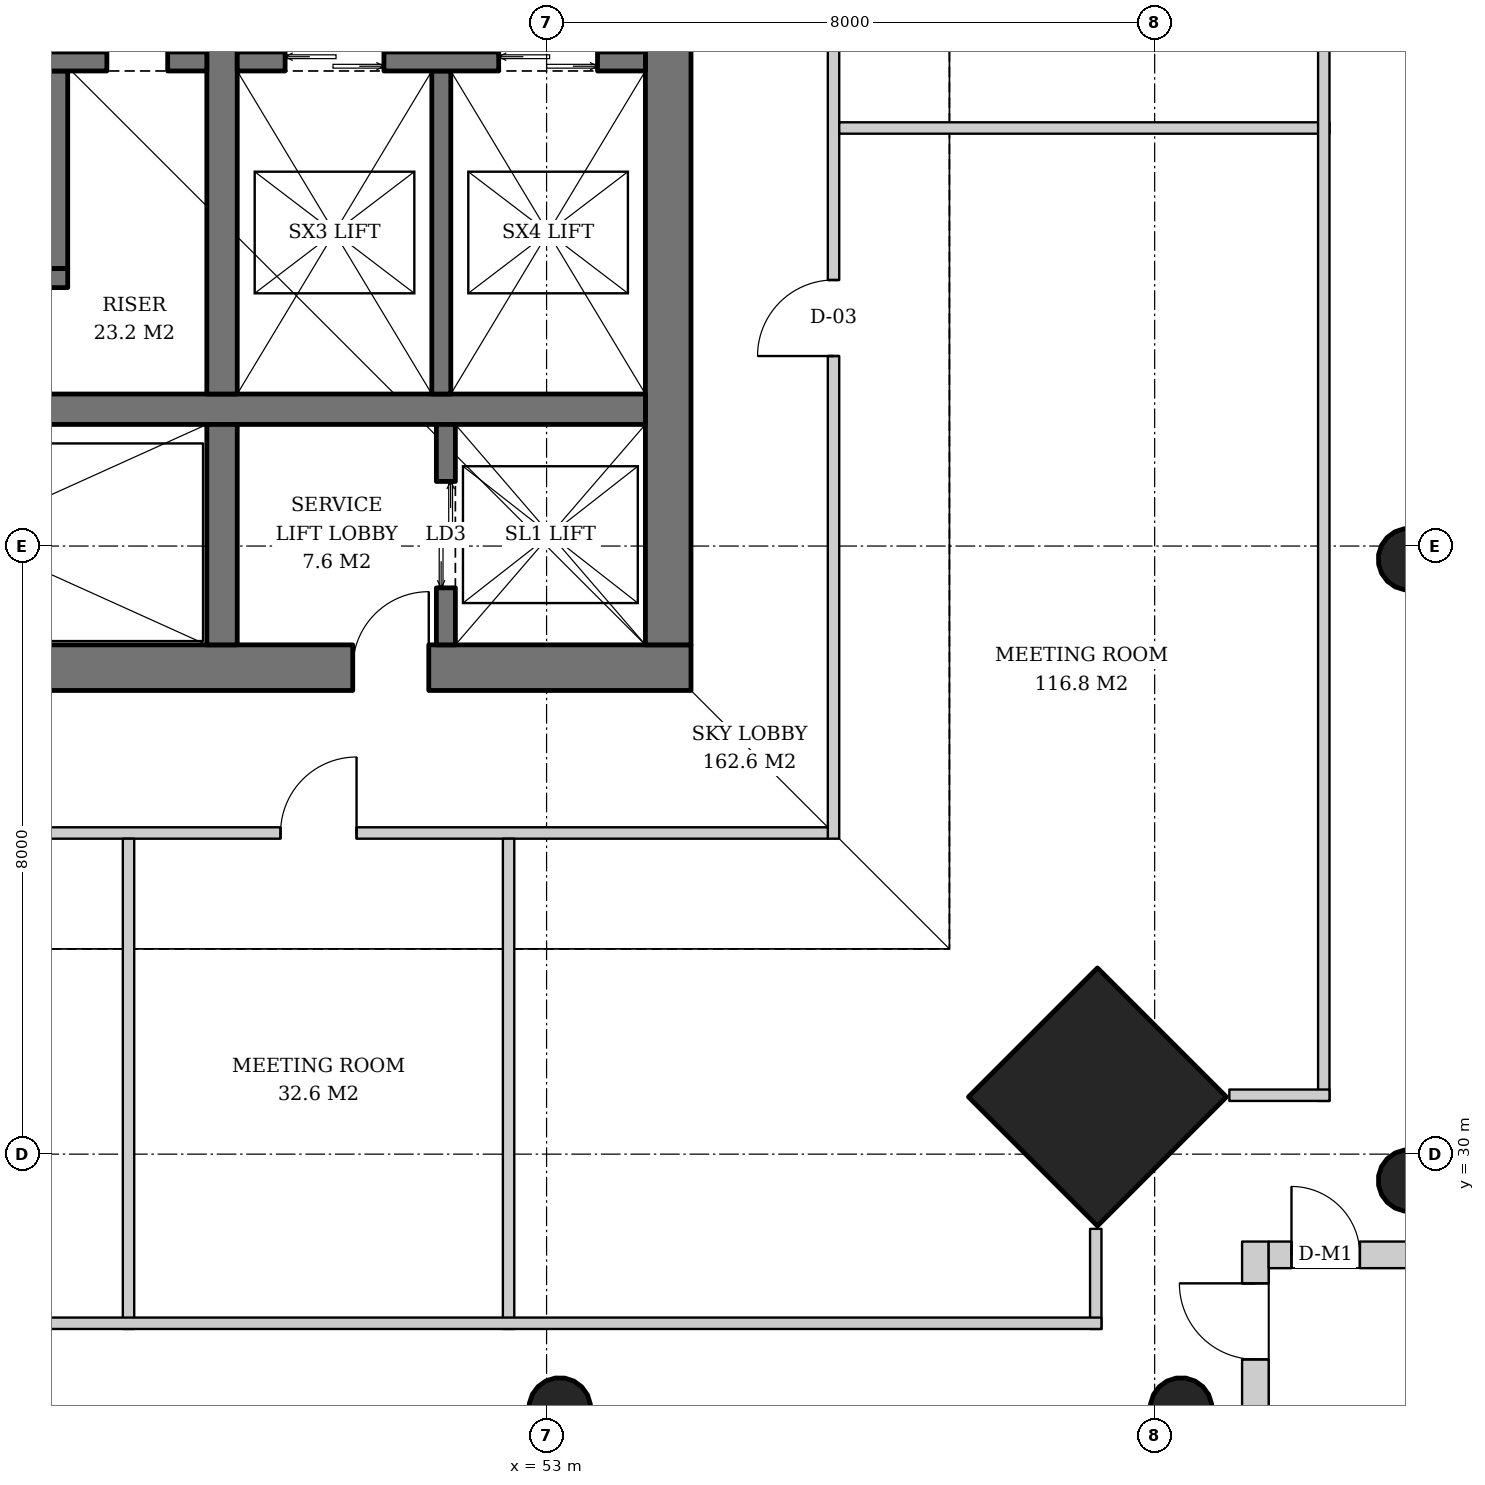
"""IFC4 building model, lengths in metres.
Left out: names, types, materials, properties, quantities, classifications, styles, units other than length and angle.
Written with IfcOpenShell. Run it as: python <this file> out.ifc"""

import sys

from ifc_helpers import new_model, si_unit, direction, frame, frame_2d, origin, origin_2d, place, context, subcontext, project, spatial, rectangle, hollow_circle, extrude, element, fill, save


model = new_model("IFC4")
c1 = context("Model", 3, precision=1e-05, world=origin(), true_north=direction((0.0, 1.0)))
c2 = subcontext(c1, "Body", "Model", "MODEL_VIEW")
j1 = project(units=[si_unit("LENGTHUNIT", "METRE"), si_unit("PLANEANGLEUNIT", "RADIAN")], contexts=[c1])
p1 = place(None, origin())
s1 = spatial("IfcSite", under=j1, at=p1, CompositionType="ELEMENT")
p2 = place(p1, origin())
s2 = spatial("IfcBuilding", under=s1, at=p2, CompositionType="ELEMENT")
p3 = place(p2, frame((0.0, 0.0, 165.4)))
s3 = spatial("IfcBuildingStorey", under=s2, at=p3, CompositionType="ELEMENT", Elevation=165.4)
p4 = place(p3, frame((64.386, 29.614, 0.0), z_axis=(-0.031898107953, 0.031898107953, 0.998981992539), x_axis=(-0.707106781187, -0.707106781187, 0.0)))
e1 = element("IfcColumn", 1, at=p4, inside=s3, PredefinedType="COLUMN", context=c2, shape_type="SweptSolid", body=[
    extrude(hollow_circle(Radius=0.406, WallThickness=0.03, at=origin_2d()), origin(), (0.0, 0.0, 1.0), 3.804),
])
p5 = place(p3, frame((64.386, 37.807, 0.0), z_axis=(-0.031910269556, 0.015987237665, 0.999362868496), x_axis=(-0.447933021895, -0.894067115991, 0.0)))
e2 = element("IfcColumn", 2, at=p5, inside=s3, PredefinedType="COLUMN", context=c2, shape_type="SweptSolid", body=[
    extrude(hollow_circle(Radius=0.406, WallThickness=0.03, at=origin_2d()), origin(), (0.0, 0.0, 1.0), 3.802),
])
p6 = place(p3, frame((60.286, 30.714, 0.0), z_axis=(-0.031898107953, 0.031898107953, 0.998981992539), x_axis=(-0.707106781187, -0.707106781187, 0.0)))
e3 = element("IfcColumn", 3, at=p6, inside=s3, PredefinedType="COLUMN", context=c2, shape_type="SweptSolid", body=[
    extrude(rectangle(XDim=2.4, YDim=2.4, at=origin_2d()), origin(), (0.0, 0.0, 1.0), 3.804),
])
p7 = place(p3, frame((61.386, 26.614, 0.0), z_axis=(-0.031898107953, 0.031898107953, 0.998981992539), x_axis=(-0.707106781187, -0.707106781187, 0.0)))
e4 = element("IfcColumn", 4, at=p7, inside=s3, PredefinedType="COLUMN", context=c2, shape_type="SweptSolid", body=[
    extrude(hollow_circle(Radius=0.406, WallThickness=0.03, at=origin_2d()), origin(), (0.0, 0.0, 1.0), 3.804),
])
p8 = place(p3, frame((53.193, 26.614, 0.0), z_axis=(-0.015987237665, 0.031910269556, 0.999362868496), x_axis=(-0.894067115991, -0.447933021895, 0.0)))
e5 = element("IfcColumn", 5, at=p8, inside=s3, PredefinedType="COLUMN", context=c2, shape_type="SweptSolid", body=[
    extrude(hollow_circle(Radius=0.406, WallThickness=0.03, at=origin_2d()), origin(), (0.0, 0.0, 1.0), 3.802),
])
p9 = place(p3, frame((35.1, 36.4, 0.0), z_axis=(0.0, 0.0, 1.0), x_axis=(1.0, 0.0, 0.0)))
e6 = element("IfcWall", 6, at=p9, inside=s3, PredefinedType="SHEAR", context=c2, shape_type="SweptSolid", body=[
    extrude(rectangle(XDim=19.8, YDim=0.6, at=frame_2d((9.9, 0.0))), origin(), (0.0, 0.0, 1.0), 3.8),
])
p10 = place(p9, frame((3.9, 0.0, 0.0)))
e7 = element("IfcOpeningElement", 7, at=p10, cuts=e6, PredefinedType="OPENING", context=c2, shape_type="SweptSolid", body=[
    extrude(rectangle(XDim=1.0, YDim=2.1, at=frame_2d((0.5, 1.05))), frame((0.0, 0.31, 0.0), z_axis=(0.0, -1.0, 0.0), x_axis=(1.0, 0.0, 0.0)), (0.0, 0.0, 1.0), 0.62),
])
p11 = place(p9, frame((15.35, 0.0, 0.0)))
e8 = element("IfcOpeningElement", 8, at=p11, cuts=e6, PredefinedType="OPENING", context=c2, shape_type="SweptSolid", body=[
    extrude(rectangle(XDim=1.0, YDim=2.1, at=frame_2d((0.5, 1.05))), frame((0.0, 0.31, 0.0), z_axis=(0.0, -1.0, 0.0), x_axis=(1.0, 0.0, 0.0)), (0.0, 0.0, 1.0), 0.62),
])
p12 = place(p3, frame((54.6, 36.7, 0.0), z_axis=(0.0, 0.0, 1.0), x_axis=(0.0, 1.0, 0.0)))
e9 = element("IfcWall", 9, at=p12, inside=s3, PredefinedType="SHEAR", context=c2, shape_type="SweptSolid", body=[
    extrude(rectangle(XDim=18.6, YDim=0.6, at=frame_2d((9.3, 0.0))), origin(), (0.0, 0.0, 1.0), 3.8),
])
p13 = place(p12, frame((8.4, 0.0, 0.0)))
e10 = element("IfcOpeningElement", 10, at=p13, cuts=e9, PredefinedType="OPENING", context=c2, shape_type="SweptSolid", body=[
    extrude(rectangle(XDim=1.8, YDim=2.4, at=frame_2d((0.9, 1.2))), frame((0.0, 0.31, 0.0), z_axis=(0.0, -1.0, 0.0), x_axis=(1.0, 0.0, 0.0)), (0.0, 0.0, 1.0), 0.62),
])
p14 = place(p3, frame((35.7, 39.8, 0.0), z_axis=(0.0, 0.0, 1.0), x_axis=(1.0, 0.0, 0.0)))
e11 = element("IfcWall", 11, at=p14, inside=s3, PredefinedType="SHEAR", context=c2, shape_type="SweptSolid", body=[
    extrude(rectangle(XDim=18.6, YDim=0.4, at=frame_2d((9.3, 0.0))), origin(), (0.0, 0.0, 1.0), 3.8),
])
p15 = place(p3, frame((48.73, 36.7, 0.0), z_axis=(0.0, 0.0, 1.0), x_axis=(0.0, 1.0, 0.0)))
e12 = element("IfcWall", 12, at=p15, inside=s3, PredefinedType="SHEAR", context=c2, shape_type="SweptSolid", body=[
    extrude(rectangle(XDim=2.9, YDim=0.4, at=frame_2d((1.45, 0.0))), origin(), (0.0, 0.0, 1.0), 3.8),
])
p16 = place(p3, frame((48.73, 40.0, 0.0), z_axis=(0.0, 0.0, 1.0), x_axis=(0.0, 1.0, 0.0)))
e13 = element("IfcWall", 13, at=p16, inside=s3, PredefinedType="SHEAR", context=c2, shape_type="SweptSolid", body=[
    extrude(rectangle(XDim=12.0, YDim=0.4, at=frame_2d((6.0, 0.0))), origin(), (0.0, 0.0, 1.0), 3.8),
])
p17 = place(p3, frame((62.325, 25.5, 0.0), z_axis=(0.0, 0.0, 1.0), x_axis=(0.0, 1.0, 0.0)))
e14 = element("IfcWall", 14, at=p17, inside=s3, PredefinedType="SOLIDWALL", context=c2, shape_type="SweptSolid", body=[
    extrude(rectangle(XDim=3.35, YDim=0.35, at=frame_2d((1.675, 0.0))), origin(), (0.0, 0.0, 1.0), 3.62),
])
p18 = place(p17, frame((1.8, 0.0, 0.0)))
e15 = element("IfcOpeningElement", 15, at=p18, cuts=e14, PredefinedType="OPENING", context=c2, shape_type="SweptSolid", body=[
    extrude(rectangle(XDim=1.0, YDim=2.4, at=frame_2d((0.5, 1.2))), frame((0.0, 0.185, 0.0), z_axis=(0.0, -1.0, 0.0), x_axis=(1.0, 0.0, 0.0)), (0.0, 0.0, 1.0), 0.37),
])
p19 = place(p3, frame((62.5, 28.675, 0.0), z_axis=(0.0, 0.0, 1.0), x_axis=(1.0, 0.0, 0.0)))
e16 = element("IfcWall", 16, at=p19, inside=s3, PredefinedType="SOLIDWALL", context=c2, shape_type="SweptSolid", body=[
    extrude(rectangle(XDim=3.0, YDim=0.35, at=frame_2d((1.5, 0.0))), origin(), (0.0, 0.0, 1.0), 3.62),
])
p20 = place(p19, frame((0.3, 0.0, 0.0)))
e17 = element("IfcOpeningElement", 17, at=p20, cuts=e16, PredefinedType="OPENING", context=c2, shape_type="SweptSolid", body=[
    extrude(rectangle(XDim=0.9, YDim=2.1, at=frame_2d((0.45, 1.05))), frame((0.0, 0.185, 0.0), z_axis=(0.0, -1.0, 0.0), x_axis=(1.0, 0.0, 0.0)), (0.0, 0.0, 1.0), 0.37),
])
p21 = place(p3, frame((51.675, 36.7, 0.0), z_axis=(0.0, 0.0, 1.0), x_axis=(0.0, 1.0, 0.0)))
e18 = element("IfcWall", 18, at=p21, inside=s3, PredefinedType="SHEAR", context=c2, shape_type="SweptSolid", body=[
    extrude(rectangle(XDim=2.9, YDim=0.25, at=frame_2d((1.45, 0.0))), origin(), (0.0, 0.0, 1.0), 3.8),
])
p22 = place(p21, frame((0.75, 0.0, 0.0)))
e19 = element("IfcOpeningElement", 19, at=p22, cuts=e18, PredefinedType="OPENING", context=c2, shape_type="SweptSolid", body=[
    extrude(rectangle(XDim=1.4, YDim=2.4, at=frame_2d((0.7, 1.2))), frame((0.0, 0.135, 0.0), z_axis=(0.0, -1.0, 0.0), x_axis=(1.0, 0.0, 0.0)), (0.0, 0.0, 1.0), 0.27),
])
p23 = place(p3, frame((46.575, 44.25, 0.0), z_axis=(0.0, 0.0, 1.0), x_axis=(0.0, -1.0, 0.0)))
e20 = element("IfcWall", 20, at=p23, inside=s3, PredefinedType="SHEAR", context=c2, shape_type="SweptSolid", body=[
    extrude(rectangle(XDim=2.6, YDim=0.25, at=frame_2d((1.3, 0.0))), origin(), (0.0, 0.0, 1.0), 3.8),
])
p24 = place(p3, frame((35.7, 41.525, 0.0), z_axis=(0.0, 0.0, 1.0), x_axis=(1.0, 0.0, 0.0)))
e21 = element("IfcWall", 21, at=p24, inside=s3, PredefinedType="SHEAR", context=c2, shape_type="SweptSolid", body=[
    extrude(rectangle(XDim=11.0, YDim=0.25, at=frame_2d((5.5, 0.0))), origin(), (0.0, 0.0, 1.0), 3.8),
])
p25 = place(p3, frame((35.7, 44.375, 0.0), z_axis=(0.0, 0.0, 1.0), x_axis=(1.0, 0.0, 0.0)))
e22 = element("IfcWall", 22, at=p25, inside=s3, PredefinedType="SHEAR", context=c2, shape_type="SweptSolid", body=[
    extrude(rectangle(XDim=12.83, YDim=0.25, at=frame_2d((6.415, 0.0))), origin(), (0.0, 0.0, 1.0), 3.8),
])
p26 = place(p25, frame((0.7, 0.0, 0.0)))
e23 = element("IfcOpeningElement", 23, at=p26, cuts=e22, PredefinedType="OPENING", context=c2, shape_type="SweptSolid", body=[
    extrude(rectangle(XDim=1.1, YDim=2.2, at=frame_2d((0.55, 1.1))), frame((0.0, 0.135, 0.0), z_axis=(0.0, -1.0, 0.0), x_axis=(1.0, 0.0, 0.0)), (0.0, 0.0, 1.0), 0.27),
])
p27 = place(p25, frame((3.45, 0.0, 0.0)))
e24 = element("IfcOpeningElement", 24, at=p27, cuts=e22, PredefinedType="OPENING", context=c2, shape_type="SweptSolid", body=[
    extrude(rectangle(XDim=1.1, YDim=2.2, at=frame_2d((0.55, 1.1))), frame((0.0, 0.135, 0.0), z_axis=(0.0, -1.0, 0.0), x_axis=(1.0, 0.0, 0.0)), (0.0, 0.0, 1.0), 0.27),
])
p28 = place(p25, frame((6.2, 0.0, 0.0)))
e25 = element("IfcOpeningElement", 25, at=p28, cuts=e22, PredefinedType="OPENING", context=c2, shape_type="SweptSolid", body=[
    extrude(rectangle(XDim=1.1, YDim=2.2, at=frame_2d((0.55, 1.1))), frame((0.0, 0.135, 0.0), z_axis=(0.0, -1.0, 0.0), x_axis=(1.0, 0.0, 0.0)), (0.0, 0.0, 1.0), 0.27),
])
p29 = place(p25, frame((9.0, 0.0, 0.0)))
e26 = element("IfcOpeningElement", 26, at=p29, cuts=e22, PredefinedType="OPENING", context=c2, shape_type="SweptSolid", body=[
    extrude(rectangle(XDim=1.0, YDim=2.1, at=frame_2d((0.5, 1.05))), frame((0.0, 0.135, 0.0), z_axis=(0.0, -1.0, 0.0), x_axis=(1.0, 0.0, 0.0)), (0.0, 0.0, 1.0), 0.27),
])
p30 = place(p25, frame((11.515, 0.0, 0.0)))
e27 = element("IfcOpeningElement", 27, at=p30, cuts=e22, PredefinedType="OPENING", context=c2, shape_type="SweptSolid", body=[
    extrude(rectangle(XDim=0.8, YDim=2.0, at=frame_2d((0.4, 1.0))), frame((0.0, 0.135, 0.0), z_axis=(0.0, -1.0, 0.0), x_axis=(1.0, 0.0, 0.0)), (0.0, 0.0, 1.0), 0.27),
])
p31 = place(p3, frame((51.615, 44.25, 0.0), z_axis=(0.0, 0.0, 1.0), x_axis=(0.0, -1.0, 0.0)))
e28 = element("IfcWall", 28, at=p31, inside=s3, PredefinedType="SHEAR", context=c2, shape_type="SweptSolid", body=[
    extrude(rectangle(XDim=4.25, YDim=0.25, at=frame_2d((2.125, 0.0))), origin(), (0.0, 0.0, 1.0), 3.8),
])
p32 = place(p3, frame((48.93, 44.375, 0.0), z_axis=(0.0, 0.0, 1.0), x_axis=(1.0, 0.0, 0.0)))
e29 = element("IfcWall", 29, at=p32, inside=s3, PredefinedType="SHEAR", context=c2, shape_type="SweptSolid", body=[
    extrude(rectangle(XDim=5.37, YDim=0.25, at=frame_2d((2.685, 0.0))), origin(), (0.0, 0.0, 1.0), 3.8),
])
p33 = place(p32, frame((0.63, 0.0, 0.0)))
e30 = element("IfcOpeningElement", 30, at=p33, cuts=e29, PredefinedType="OPENING", context=c2, shape_type="SweptSolid", body=[
    extrude(rectangle(XDim=1.3, YDim=2.2, at=frame_2d((0.65, 1.1))), frame((0.0, 0.135, 0.0), z_axis=(0.0, -1.0, 0.0), x_axis=(1.0, 0.0, 0.0)), (0.0, 0.0, 1.0), 0.27),
])
p34 = place(p32, frame((3.44, 0.0, 0.0)))
e31 = element("IfcOpeningElement", 31, at=p34, cuts=e29, PredefinedType="OPENING", context=c2, shape_type="SweptSolid", body=[
    extrude(rectangle(XDim=1.3, YDim=2.2, at=frame_2d((0.65, 1.1))), frame((0.0, 0.135, 0.0), z_axis=(0.0, -1.0, 0.0), x_axis=(1.0, 0.0, 0.0)), (0.0, 0.0, 1.0), 0.27),
])
p35 = place(p3, frame((56.775, 34.15, 0.0), z_axis=(0.0, 0.0, 1.0), x_axis=(0.0, 1.0, 0.0)))
e32 = element("IfcWall", 32, at=p35, inside=s3, PredefinedType="PARTITIONING", context=c2, shape_type="SweptSolid", body=[
    extrude(rectangle(XDim=23.55, YDim=0.15, at=frame_2d((11.775, 0.0))), origin(), (0.0, 0.0, 1.0), 2.85),
])
p36 = place(p35, frame((6.35, 0.0, 0.0)))
e33 = element("IfcOpeningElement", 33, at=p36, cuts=e32, PredefinedType="OPENING", context=c2, shape_type="SweptSolid", body=[
    extrude(rectangle(XDim=1.0, YDim=2.1, at=frame_2d((0.5, 1.05))), frame((0.0, 0.085, 0.0), z_axis=(0.0, -1.0, 0.0), x_axis=(1.0, 0.0, 0.0)), (0.0, 0.0, 1.0), 0.17),
])
p37 = place(p35, frame((10.95, 0.0, 0.0)))
e34 = element("IfcOpeningElement", 34, at=p37, cuts=e32, PredefinedType="OPENING", context=c2, shape_type="SweptSolid", body=[
    extrude(rectangle(XDim=1.8, YDim=2.4, at=frame_2d((0.9, 1.2))), frame((0.0, 0.085, 0.0), z_axis=(0.0, -1.0, 0.0), x_axis=(1.0, 0.0, 0.0)), (0.0, 0.0, 1.0), 0.17),
])
p38 = place(p35, frame((15.95, 0.0, 0.0)))
e35 = element("IfcOpeningElement", 35, at=p38, cuts=e32, PredefinedType="OPENING", context=c2, shape_type="SweptSolid", body=[
    extrude(rectangle(XDim=1.8, YDim=2.4, at=frame_2d((0.9, 1.2))), frame((0.0, 0.085, 0.0), z_axis=(0.0, -1.0, 0.0), x_axis=(1.0, 0.0, 0.0)), (0.0, 0.0, 1.0), 0.17),
])
p39 = place(p3, frame((56.85, 43.5, 0.0), z_axis=(0.0, 0.0, 1.0), x_axis=(1.0, 0.0, 0.0)))
e36 = element("IfcWall", 36, at=p39, inside=s3, PredefinedType="PARTITIONING", context=c2, shape_type="SweptSolid", body=[
    extrude(rectangle(XDim=6.45, YDim=0.15, at=frame_2d((3.225, 0.0))), origin(), (0.0, 0.0, 1.0), 3.62),
])
p40 = place(p3, frame((33.15, 34.225, 0.0), z_axis=(0.0, 0.0, 1.0), x_axis=(1.0, 0.0, 0.0)))
e37 = element("IfcWall", 37, at=p40, inside=s3, PredefinedType="PARTITIONING", context=c2, shape_type="SweptSolid", body=[
    extrude(rectangle(XDim=23.55, YDim=0.15, at=frame_2d((11.775, 0.0))), origin(), (0.0, 0.0, 1.0), 2.85),
])
p41 = place(p40, frame((6.35, 0.0, 0.0)))
e38 = element("IfcOpeningElement", 38, at=p41, cuts=e37, PredefinedType="OPENING", context=c2, shape_type="SweptSolid", body=[
    extrude(rectangle(XDim=1.0, YDim=2.1, at=frame_2d((0.5, 1.05))), frame((0.0, 0.085, 0.0), z_axis=(0.0, -1.0, 0.0), x_axis=(1.0, 0.0, 0.0)), (0.0, 0.0, 1.0), 0.17),
])
p42 = place(p40, frame((11.35, 0.0, 0.0)))
e39 = element("IfcOpeningElement", 39, at=p42, cuts=e37, PredefinedType="OPENING", context=c2, shape_type="SweptSolid", body=[
    extrude(rectangle(XDim=1.0, YDim=2.1, at=frame_2d((0.5, 1.05))), frame((0.0, 0.085, 0.0), z_axis=(0.0, -1.0, 0.0), x_axis=(1.0, 0.0, 0.0)), (0.0, 0.0, 1.0), 0.17),
])
p43 = place(p40, frame((16.35, 0.0, 0.0)))
e40 = element("IfcOpeningElement", 40, at=p43, cuts=e37, PredefinedType="OPENING", context=c2, shape_type="SweptSolid", body=[
    extrude(rectangle(XDim=1.0, YDim=2.1, at=frame_2d((0.5, 1.05))), frame((0.0, 0.085, 0.0), z_axis=(0.0, -1.0, 0.0), x_axis=(1.0, 0.0, 0.0)), (0.0, 0.0, 1.0), 0.17),
])
for number, where, z_axis, x_axis in (
    (41, (47.5, 34.15, 0.0), (0.0, 0.0, 1.0), (0.0, -1.0, 0.0)),
    (42, (52.5, 34.15, 0.0), (0.0, 0.0, 1.0), (0.0, -1.0, 0.0)),
):
    element("IfcWall", number, at=place(p3, frame(where, z_axis=z_axis, x_axis=x_axis)), inside=s3, PredefinedType="PARTITIONING", context=c2, shape_type="SweptSolid", body=[
        extrude(rectangle(XDim=6.45, YDim=0.15, at=frame_2d((3.225, 0.0))), origin(), (0.0, 0.0, 1.0), 3.62),
    ])
p44 = place(p3, frame((63.225, 61.3, 0.0), z_axis=(0.0, 0.0, 1.0), x_axis=(0.0, -1.0, 0.0)))
e43 = element("IfcWall", 43, at=p44, inside=s3, PredefinedType="PARTITIONING", context=c2, shape_type="SweptSolid", body=[
    extrude(rectangle(XDim=30.6, YDim=0.15, at=frame_2d((15.3, 0.0))), origin(), (0.0, 0.0, 1.0), 2.85),
])
for number, where, z_axis, x_axis in (
    (44, (63.3, 30.775, 0.0), (0.0, 0.0, 1.0), (-1.0, 0.0, 0.0)),
    (45, (60.225, 29.017, 0.0), (0.0, 0.0, 1.0), (0.0, -1.0, 0.0)),
):
    element("IfcWall", number, at=place(p3, frame(where, z_axis=z_axis, x_axis=x_axis)), inside=s3, PredefinedType="PARTITIONING", context=c2, shape_type="SweptSolid", body=[
        extrude(rectangle(XDim=1.317, YDim=0.15, at=frame_2d((0.659, 0.0))), origin(), (0.0, 0.0, 1.0), 3.62),
    ])
p45 = place(p3, frame((60.3, 27.775, 0.0), z_axis=(0.0, 0.0, 1.0), x_axis=(-1.0, 0.0, 0.0)))
e46 = element("IfcWall", 46, at=p45, inside=s3, PredefinedType="PARTITIONING", context=c2, shape_type="SweptSolid", body=[
    extrude(rectangle(XDim=30.6, YDim=0.15, at=frame_2d((15.3, 0.0))), origin(), (0.0, 0.0, 1.0), 2.85),
])
p46 = place(p20, origin())
e47 = element("IfcDoor", 47, at=p46, inside=s3, OperationType="SINGLE_SWING_LEFT", PredefinedType="DOOR", context=c2, shape_type="SweptSolid", body=[
    extrude(rectangle(XDim=0.9, YDim=2.1, at=frame_2d((0.45, 1.05))), frame((0.0, 0.025, 0.0), z_axis=(0.0, -1.0, 0.0), x_axis=(1.0, 0.0, 0.0)), (0.0, 0.0, 1.0), 0.05),
])
fill(e17, e47)
p47 = place(p18, origin())
e48 = element("IfcDoor", 48, at=p47, inside=s3, OperationType="SINGLE_SWING_RIGHT", PredefinedType="DOOR", context=c2, shape_type="SweptSolid", body=[
    extrude(rectangle(XDim=1.0, YDim=2.4, at=frame_2d((0.5, 1.2))), frame((0.0, 0.025, 0.0), z_axis=(0.0, -1.0, 0.0), x_axis=(1.0, 0.0, 0.0)), (0.0, 0.0, 1.0), 0.05),
])
fill(e15, e48)
p48 = place(p22, origin())
e49 = element("IfcDoor", 49, at=p48, inside=s3, OperationType="DOUBLE_DOOR_SLIDING", PredefinedType="DOOR", context=c2, shape_type="SweptSolid", body=[
    extrude(rectangle(XDim=1.4, YDim=2.4, at=frame_2d((0.7, 1.2))), frame((0.0, 0.025, 0.0), z_axis=(0.0, -1.0, 0.0), x_axis=(1.0, 0.0, 0.0)), (0.0, 0.0, 1.0), 0.05),
])
fill(e19, e49)
p49 = place(p30, origin())
e50 = element("IfcDoor", 50, at=p49, inside=s3, OperationType="SINGLE_SWING_RIGHT", PredefinedType="DOOR", context=c2, shape_type="SweptSolid", body=[
    extrude(rectangle(XDim=0.8, YDim=2.0, at=frame_2d((0.4, 1.0))), frame((0.0, 0.025, 0.0), z_axis=(0.0, -1.0, 0.0), x_axis=(1.0, 0.0, 0.0)), (0.0, 0.0, 1.0), 0.05),
])
fill(e27, e50)
p50 = place(p33, origin())
e51 = element("IfcDoor", 51, at=p50, inside=s3, OperationType="DOUBLE_DOOR_SLIDING", PredefinedType="DOOR", context=c2, shape_type="SweptSolid", body=[
    extrude(rectangle(XDim=1.3, YDim=2.2, at=frame_2d((0.65, 1.1))), frame((0.0, 0.025, 0.0), z_axis=(0.0, -1.0, 0.0), x_axis=(1.0, 0.0, 0.0)), (0.0, 0.0, 1.0), 0.05),
])
fill(e30, e51)
p51 = place(p34, origin())
e52 = element("IfcDoor", 52, at=p51, inside=s3, OperationType="DOUBLE_DOOR_SLIDING", PredefinedType="DOOR", context=c2, shape_type="SweptSolid", body=[
    extrude(rectangle(XDim=1.3, YDim=2.2, at=frame_2d((0.65, 1.1))), frame((0.0, 0.025, 0.0), z_axis=(0.0, -1.0, 0.0), x_axis=(1.0, 0.0, 0.0)), (0.0, 0.0, 1.0), 0.05),
])
fill(e31, e52)
p52 = place(p11, origin())
e53 = element("IfcDoor", 53, at=p52, inside=s3, OperationType="SINGLE_SWING_RIGHT", PredefinedType="DOOR", context=c2, shape_type="SweptSolid", body=[
    extrude(rectangle(XDim=1.0, YDim=2.1, at=frame_2d((0.5, 1.05))), frame((0.0, 0.025, 0.0), z_axis=(0.0, -1.0, 0.0), x_axis=(1.0, 0.0, 0.0)), (0.0, 0.0, 1.0), 0.05),
])
fill(e8, e53)
p53 = place(p36, origin())
e54 = element("IfcDoor", 54, at=p53, inside=s3, OperationType="SINGLE_SWING_LEFT", PredefinedType="DOOR", context=c2, shape_type="SweptSolid", body=[
    extrude(rectangle(XDim=1.0, YDim=2.1, at=frame_2d((0.5, 1.05))), frame((0.0, 0.025, 0.0), z_axis=(0.0, -1.0, 0.0), x_axis=(1.0, 0.0, 0.0)), (0.0, 0.0, 1.0), 0.05),
])
fill(e33, e54)
p54 = place(p43, origin())
e55 = element("IfcDoor", 55, at=p54, inside=s3, OperationType="SINGLE_SWING_RIGHT", PredefinedType="DOOR", context=c2, shape_type="SweptSolid", body=[
    extrude(rectangle(XDim=1.0, YDim=2.1, at=frame_2d((0.5, 1.05))), frame((0.0, 0.025, 0.0), z_axis=(0.0, -1.0, 0.0), x_axis=(1.0, 0.0, 0.0)), (0.0, 0.0, 1.0), 0.05),
])
fill(e40, e55)
save(model, sys.argv[1])
